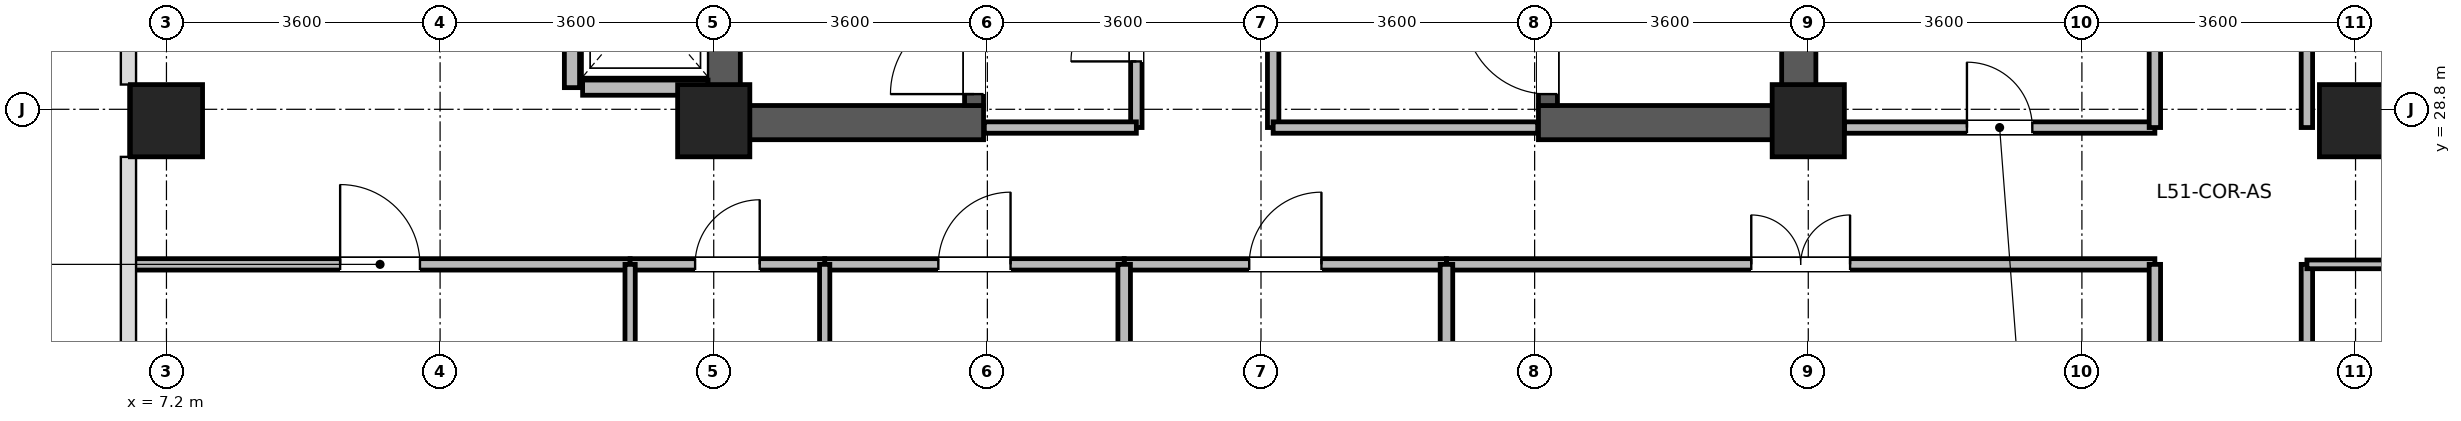
"""IFC4 building model, lengths in metres.
Left out: names, types, materials, properties, quantities, classifications, styles, units other than length and angle.
Written with IfcOpenShell. Run it as: python <this file> out.ifc"""

import sys

from ifc_helpers import new_model, si_unit, direction, frame, frame_2d, origin, origin_2d, place, context, subcontext, project, spatial, rectangle, extrude, source, transform, mapped, element, fill, save


model = new_model("IFC4")
c1 = context("Model", 3, precision=1e-05, world=origin(), true_north=direction((0.0, 1.0)))
c2 = subcontext(c1, "Body", "Model", "MODEL_VIEW")
j1 = project(units=[si_unit("LENGTHUNIT", "METRE"), si_unit("PLANEANGLEUNIT", "RADIAN")], contexts=[c1])
p1 = place(None, origin())
s1 = spatial("IfcSite", under=j1, at=p1, CompositionType="ELEMENT")
p2 = place(p1, origin())
s2 = spatial("IfcBuilding", under=s1, at=p2, CompositionType="ELEMENT")
p3 = place(p2, frame((0.0, 0.0, 201.8)))
s3 = spatial("IfcBuildingStorey", under=s2, at=p3, CompositionType="ELEMENT", Elevation=201.8)
for number, where, z_axis, x_axis in (
    (1, (14.525, 28.4, 0.0), (0.0, 0.0, 1.0), (0.0, 1.0, 0.0)),
    (2, (28.675, 28.4, 0.0), (0.0, 0.0, 1.0), (0.0, 1.0, 0.0)),
):
    element("IfcWall", number, at=place(p3, frame(where, z_axis=z_axis, x_axis=x_axis)), inside=s3, PredefinedType="SHEAR", context=c2, shape_type="SweptSolid", body=[
        extrude(rectangle(XDim=7.9, YDim=0.45, at=frame_2d((3.95, 0.0))), origin(), (0.0, 0.0, 1.0), 3.47),
    ])
for number, where, z_axis, x_axis in (
    (3, (14.75, 28.625, 0.0), (0.0, 0.0, 1.0), (1.0, 0.0, 0.0)),
    (4, (25.25, 28.625, 0.0), (0.0, 0.0, 1.0), (1.0, 0.0, 0.0)),
):
    element("IfcWall", number, at=place(p3, frame(where, z_axis=z_axis, x_axis=x_axis)), inside=s3, PredefinedType="SHEAR", context=c2, shape_type="SweptSolid", body=[
        extrude(rectangle(XDim=3.2, YDim=0.45, at=frame_2d((1.6, 0.0))), origin(), (0.0, 0.0, 1.0), 3.47),
    ])
p4 = place(p3, frame((17.825, 28.85, 0.0), z_axis=(0.0, 0.0, 1.0), x_axis=(0.0, 1.0, 0.0)))
e5 = element("IfcWall", 5, at=p4, inside=s3, PredefinedType="SHEAR", context=c2, shape_type="SweptSolid", body=[
    extrude(rectangle(XDim=7.0, YDim=0.25, at=frame_2d((3.5, 0.0))), origin(), (0.0, 0.0, 1.0), 3.47),
])
p5 = place(p4, frame((0.15, 0.0, 0.0)))
e6 = element("IfcOpeningElement", 6, at=p5, cuts=e5, PredefinedType="OPENING", context=c2, shape_type="SweptSolid", body=[
    extrude(rectangle(XDim=1.1, YDim=2.08, at=frame_2d((0.55, 1.04))), frame((0.0, 0.135, 0.0), z_axis=(0.0, -1.0, 0.0), x_axis=(1.0, 0.0, 0.0)), (0.0, 0.0, 1.0), 0.27),
])
p6 = place(p3, frame((25.375, 28.85, 0.0), z_axis=(0.0, 0.0, 1.0), x_axis=(0.0, 1.0, 0.0)))
e7 = element("IfcWall", 7, at=p6, inside=s3, PredefinedType="SHEAR", context=c2, shape_type="SweptSolid", body=[
    extrude(rectangle(XDim=7.0, YDim=0.25, at=frame_2d((3.5, 0.0))), origin(), (0.0, 0.0, 1.0), 3.47),
])
p7 = place(p6, frame((0.15, 0.0, 0.0)))
e8 = element("IfcOpeningElement", 8, at=p7, cuts=e7, PredefinedType="OPENING", context=c2, shape_type="SweptSolid", body=[
    extrude(rectangle(XDim=1.1, YDim=2.08, at=frame_2d((0.55, 1.04))), frame((0.0, 0.135, 0.0), z_axis=(0.0, -1.0, 0.0), x_axis=(1.0, 0.0, 0.0)), (0.0, 0.0, 1.0), 0.27),
])
m1 = source(origin(), c2, "Body", "SweptSolid", [
    extrude(rectangle(XDim=0.95, YDim=0.95, at=origin_2d()), origin(), (0.0, 0.0, 1.0), 3.7),
])
for number, where, z_axis, x_axis in (
    (9, (7.2, 28.65, 0.0), (0.0, 0.0, 1.0), (1.0, 0.0, 0.0)),
    (10, (14.4, 28.65, 0.0), (0.0, 0.0, 1.0), (1.0, 0.0, 0.0)),
    (11, (28.8, 28.65, 0.0), (0.0, 0.0, 1.0), (1.0, 0.0, 0.0)),
    (12, (36.0, 28.65, 0.0), (0.0, 0.0, 1.0), (1.0, 0.0, 0.0)),
):
    element("IfcColumn", number, at=place(p3, frame(where, z_axis=z_axis, x_axis=x_axis)), inside=s3, PredefinedType="COLUMN", context=c2, shape_type="MappedRepresentation", body=[
        mapped(m1, transform((0.0, 0.0, 0.0), x_axis=(1.0, 0.0, 0.0), y_axis=(0.0, 1.0, 0.0), z_axis=(0.0, 0.0, 1.0), scale=1.0)),
    ])
p8 = place(p3, frame((12.675, 29.085, 0.0), z_axis=(0.0, 0.0, 1.0), x_axis=(1.0, 0.0, 0.0)))
e13 = element("IfcWall", 13, at=p8, inside=s3, PredefinedType="PARTITIONING", context=c2, shape_type="SweptSolid", body=[
    extrude(rectangle(XDim=1.65, YDim=0.2, at=frame_2d((0.825, 0.0))), origin(), (0.0, 0.0, 1.0), 3.45),
])
p9 = place(p3, frame((12.535, 29.085, 0.0), z_axis=(0.0, 0.0, 1.0), x_axis=(0.0, 1.0, 0.0)))
e14 = element("IfcWall", 14, at=p9, inside=s3, PredefinedType="PARTITIONING", context=c2, shape_type="SweptSolid", body=[
    extrude(rectangle(XDim=2.23, YDim=0.2, at=frame_2d((1.115, 0.0))), origin(), (0.0, 0.0, 1.0), 3.45),
])
p10 = place(p3, frame((35.36, 16.96, 0.0), z_axis=(0.0, 0.0, 1.0), x_axis=(0.0, 1.0, 0.0)))
e15 = element("IfcWall", 15, at=p10, inside=s3, PredefinedType="PARTITIONING", context=c2, shape_type="SweptSolid", body=[
    extrude(rectangle(XDim=9.8, YDim=0.15, at=frame_2d((4.9, 0.0))), origin(), (0.0, 0.0, 1.0), 3.45),
])
p11 = place(p10, frame((2.486, 0.0, 0.0)))
e16 = element("IfcOpeningElement", 16, at=p11, cuts=e15, PredefinedType="OPENING", context=c2, shape_type="SweptSolid", body=[
    extrude(rectangle(XDim=1.3, YDim=2.12, at=frame_2d((0.65, 1.06))), frame((0.0, 0.085, 0.0), z_axis=(0.0, -1.0, 0.0), x_axis=(1.0, 0.0, 0.0)), (0.0, 0.0, 1.0), 0.17),
])
p12 = place(p3, frame((24.04, 26.76, 0.0), z_axis=(0.0, 0.0, 1.0), x_axis=(1.0, 0.0, 0.0)))
e17 = element("IfcWall", 17, at=p12, inside=s3, PredefinedType="PARTITIONING", context=c2, shape_type="SweptSolid", body=[
    extrude(rectangle(XDim=9.32, YDim=0.15, at=frame_2d((4.66, 0.0))), origin(), (0.0, 0.0, 1.0), 3.45),
])
p13 = place(p12, frame((4.01, 0.0, 0.0)))
e18 = element("IfcOpeningElement", 18, at=p13, cuts=e17, PredefinedType="OPENING", context=c2, shape_type="SweptSolid", body=[
    extrude(rectangle(XDim=1.3, YDim=2.12, at=frame_2d((0.65, 1.06))), frame((0.0, 0.085, 0.0), z_axis=(0.0, -1.0, 0.0), x_axis=(1.0, 0.0, 0.0)), (0.0, 0.0, 1.0), 0.17),
])
p14 = place(p3, frame((35.36, 28.56, 0.0), z_axis=(0.0, 0.0, 1.0), x_axis=(0.0, 1.0, 0.0)))
e19 = element("IfcWall", 19, at=p14, inside=s3, PredefinedType="PARTITIONING", context=c2, shape_type="SweptSolid", body=[
    extrude(rectangle(XDim=7.68, YDim=0.15, at=frame_2d((3.84, 0.0))), origin(), (0.0, 0.0, 1.0), 3.45),
])
p15 = place(p14, frame((3.19, 0.0, 0.0)))
e20 = element("IfcOpeningElement", 20, at=p15, cuts=e19, PredefinedType="OPENING", context=c2, shape_type="SweptSolid", body=[
    extrude(rectangle(XDim=1.3, YDim=2.12, at=frame_2d((0.65, 1.06))), frame((0.0, 0.085, 0.0), z_axis=(0.0, -1.0, 0.0), x_axis=(1.0, 0.0, 0.0)), (0.0, 0.0, 1.0), 0.17),
])
p16 = place(p3, frame((6.72, 26.76, 0.0), z_axis=(0.0, 0.0, 1.0), x_axis=(1.0, 0.0, 0.0)))
e21 = element("IfcWall", 21, at=p16, inside=s3, PredefinedType="PARTITIONING", context=c2, shape_type="SweptSolid", body=[
    extrude(rectangle(XDim=6.58, YDim=0.15, at=frame_2d((3.29, 0.0))), origin(), (0.0, 0.0, 1.0), 3.45),
])
p17 = place(p16, frame((2.765, 0.0, 0.0)))
e22 = element("IfcOpeningElement", 22, at=p17, cuts=e21, PredefinedType="OPENING", context=c2, shape_type="SweptSolid", body=[
    extrude(rectangle(XDim=1.05, YDim=2.12, at=frame_2d((0.525, 1.06))), frame((0.0, 0.085, 0.0), z_axis=(0.0, -1.0, 0.0), x_axis=(1.0, 0.0, 0.0)), (0.0, 0.0, 1.0), 0.17),
])
p18 = place(p3, frame((33.36, 21.6, 0.0), z_axis=(0.0, 0.0, 1.0), x_axis=(0.0, 1.0, 0.0)))
e23 = element("IfcWall", 23, at=p18, inside=s3, PredefinedType="PARTITIONING", context=c2, shape_type="SweptSolid", body=[
    extrude(rectangle(XDim=5.16, YDim=0.15, at=frame_2d((2.58, 0.0))), origin(), (0.0, 0.0, 1.0), 3.45),
])
p19 = place(p3, frame((29.275, 28.56, 0.0), z_axis=(0.0, 0.0, 1.0), x_axis=(1.0, 0.0, 0.0)))
e24 = element("IfcWall", 24, at=p19, inside=s3, PredefinedType="PARTITIONING", context=c2, shape_type="SweptSolid", body=[
    extrude(rectangle(XDim=4.085, YDim=0.15, at=frame_2d((2.042, 0.0))), origin(), (0.0, 0.0, 1.0), 2.85),
])
p20 = place(p19, frame((1.613, 0.0, 0.0)))
e25 = element("IfcOpeningElement", 25, at=p20, cuts=e24, PredefinedType="OPENING", context=c2, shape_type="SweptSolid", body=[
    extrude(rectangle(XDim=0.86, YDim=2.02, at=frame_2d((0.43, 1.01))), frame((0.0, 0.085, 0.0), z_axis=(0.0, -1.0, 0.0), x_axis=(1.0, 0.0, 0.0)), (0.0, 0.0, 1.0), 0.17),
])
p21 = place(p3, frame((19.8, 26.76, 0.0), z_axis=(0.0, 0.0, 1.0), x_axis=(1.0, 0.0, 0.0)))
e26 = element("IfcWall", 26, at=p21, inside=s3, PredefinedType="PARTITIONING", context=c2, shape_type="SweptSolid", body=[
    extrude(rectangle(XDim=4.24, YDim=0.15, at=frame_2d((2.12, 0.0))), origin(), (0.0, 0.0, 1.0), 3.45),
])
p22 = place(p21, frame((1.645, 0.0, 0.0)))
e27 = element("IfcOpeningElement", 27, at=p22, cuts=e26, PredefinedType="OPENING", context=c2, shape_type="SweptSolid", body=[
    extrude(rectangle(XDim=0.95, YDim=2.1, at=frame_2d((0.475, 1.05))), frame((0.0, 0.085, 0.0), z_axis=(0.0, -1.0, 0.0), x_axis=(1.0, 0.0, 0.0)), (0.0, 0.0, 1.0), 0.17),
])
p23 = place(p3, frame((15.86, 26.76, 0.0), z_axis=(0.0, 0.0, 1.0), x_axis=(1.0, 0.0, 0.0)))
e28 = element("IfcWall", 28, at=p23, inside=s3, PredefinedType="PARTITIONING", context=c2, shape_type="SweptSolid", body=[
    extrude(rectangle(XDim=3.94, YDim=0.15, at=frame_2d((1.97, 0.0))), origin(), (0.0, 0.0, 1.0), 3.45),
])
p24 = place(p23, frame((1.495, 0.0, 0.0)))
e29 = element("IfcOpeningElement", 29, at=p24, cuts=e28, PredefinedType="OPENING", context=c2, shape_type="SweptSolid", body=[
    extrude(rectangle(XDim=0.95, YDim=2.1, at=frame_2d((0.475, 1.05))), frame((0.0, 0.085, 0.0), z_axis=(0.0, -1.0, 0.0), x_axis=(1.0, 0.0, 0.0)), (0.0, 0.0, 1.0), 0.17),
])
p25 = place(p3, frame((33.36, 28.56, 0.0), z_axis=(0.0, 0.0, 1.0), x_axis=(0.0, 1.0, 0.0)))
e30 = element("IfcWall", 30, at=p25, inside=s3, PredefinedType="PARTITIONING", context=c2, shape_type="SweptSolid", body=[
    extrude(rectangle(XDim=3.84, YDim=0.15, at=frame_2d((1.92, 0.0))), origin(), (0.0, 0.0, 1.0), 3.45),
])
p26 = place(p3, frame((19.96, 28.56, 0.0), z_axis=(0.0, 0.0, 1.0), x_axis=(0.0, 1.0, 0.0)))
e31 = element("IfcWall", 31, at=p26, inside=s3, PredefinedType="PARTITIONING", context=c2, shape_type="SweptSolid", body=[
    extrude(rectangle(XDim=2.6, YDim=0.15, at=frame_2d((1.3, 0.0))), origin(), (0.0, 0.0, 1.0), 3.45),
])
p27 = place(p26, frame((0.87, 0.0, 0.0)))
e32 = element("IfcOpeningElement", 32, at=p27, cuts=e31, PredefinedType="OPENING", context=c2, shape_type="SweptSolid", body=[
    extrude(rectangle(XDim=0.86, YDim=2.02, at=frame_2d((0.43, 1.01))), frame((0.0, 0.085, 0.0), z_axis=(0.0, -1.0, 0.0), x_axis=(1.0, 0.0, 0.0)), (0.0, 0.0, 1.0), 0.17),
])
p28 = place(p3, frame((13.3, 26.76, 0.0), z_axis=(0.0, 0.0, 1.0), x_axis=(1.0, 0.0, 0.0)))
e33 = element("IfcWall", 33, at=p28, inside=s3, PredefinedType="PARTITIONING", context=c2, shape_type="SweptSolid", body=[
    extrude(rectangle(XDim=2.56, YDim=0.15, at=frame_2d((1.28, 0.0))), origin(), (0.0, 0.0, 1.0), 3.45),
])
p29 = place(p28, frame((0.855, 0.0, 0.0)))
e34 = element("IfcOpeningElement", 34, at=p29, cuts=e33, PredefinedType="OPENING", context=c2, shape_type="SweptSolid", body=[
    extrude(rectangle(XDim=0.85, YDim=2.04, at=frame_2d((0.425, 1.02))), frame((0.0, 0.085, 0.0), z_axis=(0.0, -1.0, 0.0), x_axis=(1.0, 0.0, 0.0)), (0.0, 0.0, 1.0), 0.17),
])
p30 = place(p3, frame((17.96, 28.56, 0.0), z_axis=(0.0, 0.0, 1.0), x_axis=(1.0, 0.0, 0.0)))
e35 = element("IfcWall", 35, at=p30, inside=s3, PredefinedType="PARTITIONING", context=c2, shape_type="SweptSolid", body=[
    extrude(rectangle(XDim=2.0, YDim=0.15, at=frame_2d((1.0, 0.0))), origin(), (0.0, 0.0, 1.0), 2.45),
])
p31 = place(p3, frame((35.36, 26.76, 0.0), z_axis=(0.0, 0.0, 1.0), x_axis=(1.0, 0.0, 0.0)))
e36 = element("IfcWall", 36, at=p31, inside=s3, PredefinedType="PARTITIONING", context=c2, shape_type="SweptSolid", body=[
    extrude(rectangle(XDim=9.16, YDim=0.115, at=frame_2d((4.58, 0.0))), origin(), (0.0, 0.0, 1.0), 3.45),
])
p32 = place(p3, frame((15.86, 21.732, 0.0), z_axis=(0.0, 0.0, 1.0), x_axis=(0.0, 1.0, 0.0)))
e37 = element("IfcWall", 37, at=p32, inside=s3, PredefinedType="PARTITIONING", context=c2, shape_type="SweptSolid", body=[
    extrude(rectangle(XDim=5.028, YDim=0.135, at=frame_2d((2.514, 0.0))), origin(), (0.0, 0.0, 1.0), 3.45),
])
for number, where, z_axis, x_axis in (
    (38, (19.8, 21.732, 0.0), (0.0, 0.0, 1.0), (0.0, 1.0, 0.0)),
    (39, (24.04, 21.732, 0.0), (0.0, 0.0, 1.0), (0.0, 1.0, 0.0)),
):
    element("IfcWall", number, at=place(p3, frame(where, z_axis=z_axis, x_axis=x_axis)), inside=s3, PredefinedType="PARTITIONING", context=c2, shape_type="SweptSolid", body=[
        extrude(rectangle(XDim=5.028, YDim=0.165, at=frame_2d((2.514, 0.0))), origin(), (0.0, 0.0, 1.0), 3.45),
    ])
p33 = place(p3, frame((21.76, 28.56, 0.0), z_axis=(0.0, 0.0, 1.0), x_axis=(0.0, 1.0, 0.0)))
e40 = element("IfcWall", 40, at=p33, inside=s3, PredefinedType="PARTITIONING", context=c2, shape_type="SweptSolid", body=[
    extrude(rectangle(XDim=4.6, YDim=0.15, at=frame_2d((2.3, 0.0))), origin(), (0.0, 0.0, 1.0), 3.45),
])
p34 = place(p33, frame((1.55, 0.0, 0.0)))
e41 = element("IfcOpeningElement", 41, at=p34, cuts=e40, PredefinedType="OPENING", context=c2, shape_type="SweptSolid", body=[
    extrude(rectangle(XDim=1.5, YDim=2.1, at=frame_2d((0.75, 1.05))), frame((0.0, 0.085, 0.0), z_axis=(0.0, -1.0, 0.0), x_axis=(1.0, 0.0, 0.0)), (0.0, 0.0, 1.0), 0.17),
])
p35 = place(p3, frame((21.76, 28.56, 0.0), z_axis=(0.0, 0.0, 1.0), x_axis=(1.0, 0.0, 0.0)))
e42 = element("IfcWall", 42, at=p35, inside=s3, PredefinedType="PARTITIONING", context=c2, shape_type="SweptSolid", body=[
    extrude(rectangle(XDim=3.48, YDim=0.15, at=frame_2d((1.74, 0.0))), origin(), (0.0, 0.0, 1.0), 2.45),
])
p36 = place(p3, frame((13.3, 23.5, 0.0), z_axis=(0.0, 0.0, 1.0), x_axis=(0.0, 1.0, 0.0)))
e43 = element("IfcWall", 43, at=p36, inside=s3, PredefinedType="PARTITIONING", context=c2, shape_type="SweptSolid", body=[
    extrude(rectangle(XDim=3.26, YDim=0.135, at=frame_2d((1.63, 0.0))), origin(), (0.0, 0.0, 1.0), 3.45),
])
p37 = place(p5, origin())
e44 = element("IfcDoor", 44, at=p37, inside=s3, OperationType="SINGLE_SWING_LEFT", PredefinedType="DOOR", context=c2, shape_type="SweptSolid", body=[
    extrude(rectangle(XDim=1.1, YDim=2.08, at=frame_2d((0.55, 1.04))), frame((0.0, 0.025, 0.0), z_axis=(0.0, -1.0, 0.0), x_axis=(1.0, 0.0, 0.0)), (0.0, 0.0, 1.0), 0.05),
])
fill(e6, e44)
p38 = place(p7, origin())
e45 = element("IfcDoor", 45, at=p38, inside=s3, OperationType="SINGLE_SWING_RIGHT", PredefinedType="DOOR", context=c2, shape_type="SweptSolid", body=[
    extrude(rectangle(XDim=1.1, YDim=2.08, at=frame_2d((0.55, 1.04))), frame((0.0, 0.025, 0.0), z_axis=(0.0, -1.0, 0.0), x_axis=(1.0, 0.0, 0.0)), (0.0, 0.0, 1.0), 0.05),
])
fill(e8, e45)
p39 = place(p13, origin())
e46 = element("IfcDoor", 46, at=p39, inside=s3, OperationType="DOUBLE_DOOR_SINGLE_SWING", PredefinedType="DOOR", context=c2, shape_type="SweptSolid", body=[
    extrude(rectangle(XDim=1.3, YDim=2.12, at=frame_2d((0.65, 1.06))), frame((0.0, 0.025, 0.0), z_axis=(0.0, -1.0, 0.0), x_axis=(1.0, 0.0, 0.0)), (0.0, 0.0, 1.0), 0.05),
])
fill(e18, e46)
p40 = place(p17, origin())
e47 = element("IfcDoor", 47, at=p40, inside=s3, OperationType="SINGLE_SWING_LEFT", PredefinedType="DOOR", context=c2, shape_type="SweptSolid", body=[
    extrude(rectangle(XDim=1.05, YDim=2.12, at=frame_2d((0.525, 1.06))), frame((0.0, 0.025, 0.0), z_axis=(0.0, -1.0, 0.0), x_axis=(1.0, 0.0, 0.0)), (0.0, 0.0, 1.0), 0.05),
])
fill(e22, e47)
p41 = place(p20, origin())
e48 = element("IfcDoor", 48, at=p41, inside=s3, OperationType="SINGLE_SWING_LEFT", PredefinedType="DOOR", context=c2, shape_type="SweptSolid", body=[
    extrude(rectangle(XDim=0.86, YDim=2.02, at=frame_2d((0.43, 1.01))), frame((0.0, 0.025, 0.0), z_axis=(0.0, -1.0, 0.0), x_axis=(1.0, 0.0, 0.0)), (0.0, 0.0, 1.0), 0.05),
])
fill(e25, e48)
p42 = place(p22, origin())
e49 = element("IfcDoor", 49, at=p42, inside=s3, OperationType="SINGLE_SWING_RIGHT", PredefinedType="DOOR", context=c2, shape_type="SweptSolid", body=[
    extrude(rectangle(XDim=0.95, YDim=2.1, at=frame_2d((0.475, 1.05))), frame((0.0, 0.025, 0.0), z_axis=(0.0, -1.0, 0.0), x_axis=(1.0, 0.0, 0.0)), (0.0, 0.0, 1.0), 0.05),
])
fill(e27, e49)
p43 = place(p24, origin())
e50 = element("IfcDoor", 50, at=p43, inside=s3, OperationType="SINGLE_SWING_RIGHT", PredefinedType="DOOR", context=c2, shape_type="SweptSolid", body=[
    extrude(rectangle(XDim=0.95, YDim=2.1, at=frame_2d((0.475, 1.05))), frame((0.0, 0.025, 0.0), z_axis=(0.0, -1.0, 0.0), x_axis=(1.0, 0.0, 0.0)), (0.0, 0.0, 1.0), 0.05),
])
fill(e29, e50)
p44 = place(p27, origin())
e51 = element("IfcDoor", 51, at=p44, inside=s3, OperationType="SINGLE_SWING_LEFT", PredefinedType="DOOR", context=c2, shape_type="SweptSolid", body=[
    extrude(rectangle(XDim=0.86, YDim=2.02, at=frame_2d((0.43, 1.01))), frame((0.0, 0.025, 0.0), z_axis=(0.0, -1.0, 0.0), x_axis=(1.0, 0.0, 0.0)), (0.0, 0.0, 1.0), 0.05),
])
fill(e32, e51)
p45 = place(p29, origin())
e52 = element("IfcDoor", 52, at=p45, inside=s3, OperationType="SINGLE_SWING_RIGHT", PredefinedType="DOOR", context=c2, shape_type="SweptSolid", body=[
    extrude(rectangle(XDim=0.85, YDim=2.04, at=frame_2d((0.425, 1.02))), frame((0.0, 0.025, 0.0), z_axis=(0.0, -1.0, 0.0), x_axis=(1.0, 0.0, 0.0)), (0.0, 0.0, 1.0), 0.05),
])
fill(e34, e52)
save(model, sys.argv[1])
